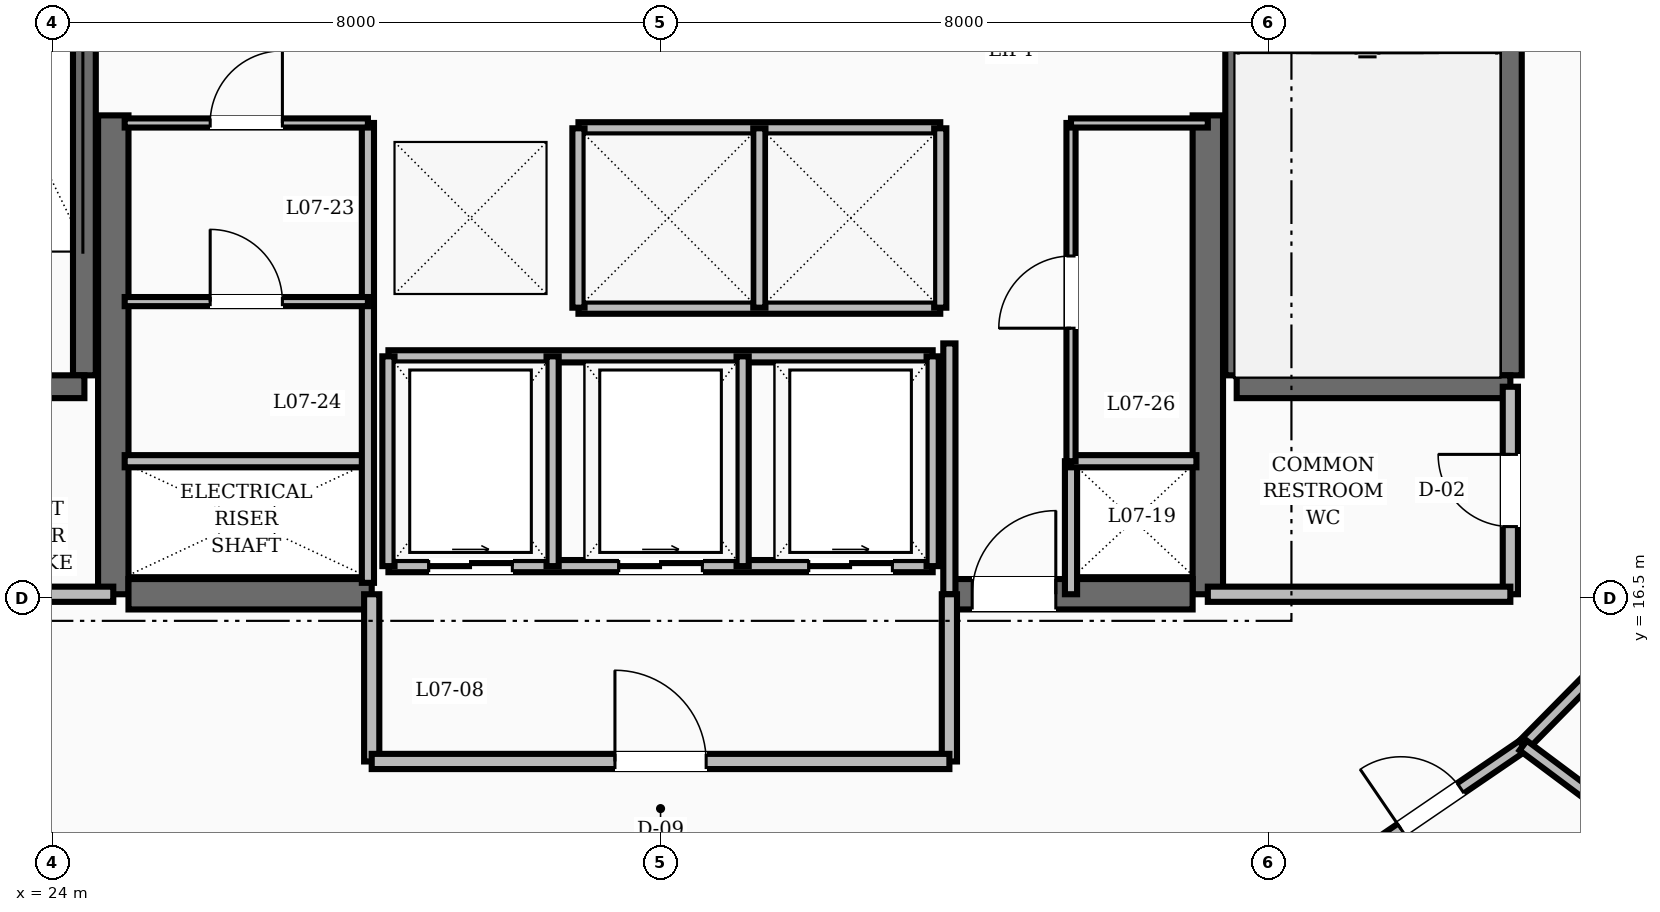
"""IFC4 building model, lengths in metres.
Left out: names, types, materials, properties, quantities, classifications, styles, units other than length and angle.
Written with IfcOpenShell. Run it as: python <this file> out.ifc"""

import sys

from ifc_helpers import new_model, si_unit, direction, frame, frame_2d, origin, place, context, subcontext, project, spatial, rectangle, extrude, element, fill, save


model = new_model("IFC4")
c1 = context("Model", 3, precision=1e-05, world=origin(), true_north=direction((0.0, 1.0)))
c2 = subcontext(c1, "Body", "Model", "MODEL_VIEW")
j1 = project(units=[si_unit("LENGTHUNIT", "METRE"), si_unit("PLANEANGLEUNIT", "RADIAN")], contexts=[c1])
p1 = place(None, origin())
s1 = spatial("IfcSite", under=j1, at=p1, CompositionType="ELEMENT")
p2 = place(p1, origin())
s2 = spatial("IfcBuilding", under=s1, at=p2, CompositionType="ELEMENT")
p3 = place(p2, frame((0.0, 0.0, 34.0)))
s3 = spatial("IfcBuildingStorey", under=s2, at=p3, CompositionType="ELEMENT", Elevation=34.0)
for number, where, z_axis, x_axis in (
    (1, (24.8, 16.55, 0.0), (0.0, 0.0, 1.0), (0.0, 1.0, 0.0)),
    (2, (39.2, 16.55, 0.0), (0.0, 0.0, 1.0), (0.0, 1.0, 0.0)),
):
    element("IfcWall", number, at=place(p3, frame(where, z_axis=z_axis, x_axis=x_axis)), inside=s3, PredefinedType="SHEAR", context=c2, shape_type="SweptSolid", body=[
        extrude(rectangle(XDim=6.3, YDim=0.4, at=frame_2d((3.15, 0.0))), origin(), (0.0, 0.0, 1.0), 3.6),
    ])
p4 = place(p3, frame((25.0, 16.55, 0.0), z_axis=(0.0, 0.0, 1.0), x_axis=(1.0, 0.0, 0.0)))
e3 = element("IfcWall", 3, at=p4, inside=s3, PredefinedType="SHEAR", context=c2, shape_type="SweptSolid", body=[
    extrude(rectangle(XDim=3.2, YDim=0.4, at=frame_2d((1.6, 0.0))), origin(), (0.0, 0.0, 1.0), 3.6),
])
p5 = place(p3, frame((35.8, 16.55, 0.0), z_axis=(0.0, 0.0, 1.0), x_axis=(1.0, 0.0, 0.0)))
e4 = element("IfcWall", 4, at=p5, inside=s3, PredefinedType="SHEAR", context=c2, shape_type="SweptSolid", body=[
    extrude(rectangle(XDim=3.2, YDim=0.4, at=frame_2d((1.6, 0.0))), origin(), (0.0, 0.0, 1.0), 3.6),
])
p6 = place(p5, frame((0.3, 0.0, 0.0)))
e5 = element("IfcOpeningElement", 5, at=p6, cuts=e4, PredefinedType="OPENING", context=c2, shape_type="SweptSolid", body=[
    extrude(rectangle(XDim=1.1, YDim=2.1, at=frame_2d((0.55, 1.05))), frame((0.0, 0.21, 0.0), z_axis=(0.0, -1.0, 0.0), x_axis=(1.0, 0.0, 0.0)), (0.0, 0.0, 1.0), 0.42),
])
p7 = place(p3, frame((24.42, 19.43, 0.0), z_axis=(0.0, 0.0, 1.0), x_axis=(0.0, 1.0, 0.0)))
e6 = element("IfcWall", 6, at=p7, inside=s3, PredefinedType="SHEAR", context=c2, shape_type="SweptSolid", body=[
    extrude(rectangle(XDim=8.74, YDim=0.3, at=frame_2d((4.37, 0.0))), origin(), (0.0, 0.0, 1.0), 3.6),
])
p8 = place(p3, frame((20.82, 19.28, 0.0), z_axis=(0.0, 0.0, 1.0), x_axis=(1.0, 0.0, 0.0)))
e7 = element("IfcWall", 7, at=p8, inside=s3, PredefinedType="SHEAR", context=c2, shape_type="SweptSolid", body=[
    extrude(rectangle(XDim=3.6, YDim=0.3, at=frame_2d((1.8, 0.0))), origin(), (0.0, 0.0, 1.0), 3.6),
])
p9 = place(p8, frame((1.3, 0.0, 0.0)))
e8 = element("IfcOpeningElement", 8, at=p9, cuts=e7, PredefinedType="OPENING", context=c2, shape_type="SweptSolid", body=[
    extrude(rectangle(XDim=1.1, YDim=2.1, at=frame_2d((0.55, 1.05))), frame((0.0, 0.16, 0.0), z_axis=(0.0, -1.0, 0.0), x_axis=(1.0, 0.0, 0.0)), (0.0, 0.0, 1.0), 0.32),
])
for number, where, z_axis, x_axis in (
    (9, (43.18, 19.43, 0.0), (0.0, 0.0, 1.0), (0.0, 1.0, 0.0)),
    (10, (39.58, 19.43, 0.0), (0.0, 0.0, 1.0), (0.0, 1.0, 0.0)),
):
    element("IfcWall", number, at=place(p3, frame(where, z_axis=z_axis, x_axis=x_axis)), inside=s3, PredefinedType="SHEAR", context=c2, shape_type="SweptSolid", body=[
        extrude(rectangle(XDim=8.74, YDim=0.3, at=frame_2d((4.37, 0.0))), origin(), (0.0, 0.0, 1.0), 3.6),
    ])
p10 = place(p3, frame((39.58, 19.28, 0.0), z_axis=(0.0, 0.0, 1.0), x_axis=(1.0, 0.0, 0.0)))
e11 = element("IfcWall", 11, at=p10, inside=s3, PredefinedType="SHEAR", context=c2, shape_type="SweptSolid", body=[
    extrude(rectangle(XDim=3.6, YDim=0.3, at=frame_2d((1.8, 0.0))), origin(), (0.0, 0.0, 1.0), 3.6),
])
p11 = place(p3, frame((20.82, 16.55, 0.0), z_axis=(0.0, 0.0, 1.0), x_axis=(1.0, 0.0, 0.0)))
e12 = element("IfcWall", 12, at=p11, inside=s3, PredefinedType="SOLIDWALL", context=c2, shape_type="SweptSolid", body=[
    extrude(rectangle(XDim=3.98, YDim=0.2, at=frame_2d((1.99, 0.0))), origin(), (0.0, 0.0, 1.0), 2.61),
])
p12 = place(p3, frame((43.18, 16.55, 0.0), z_axis=(0.0, 0.0, 1.0), x_axis=(0.0, 1.0, 0.0)))
e13 = element("IfcWall", 13, at=p12, inside=s3, PredefinedType="SOLIDWALL", context=c2, shape_type="SweptSolid", body=[
    extrude(rectangle(XDim=2.73, YDim=0.2, at=frame_2d((1.365, 0.0))), origin(), (0.0, 0.0, 1.0), 2.61),
])
p13 = place(p12, frame((0.89, 0.0, 0.0)))
e14 = element("IfcOpeningElement", 14, at=p13, cuts=e13, PredefinedType="OPENING", context=c2, shape_type="SweptSolid", body=[
    extrude(rectangle(XDim=0.95, YDim=2.1, at=frame_2d((0.475, 1.05))), frame((0.0, 0.11, 0.0), z_axis=(0.0, -1.0, 0.0), x_axis=(1.0, 0.0, 0.0)), (0.0, 0.0, 1.0), 0.22),
])
p14 = place(p3, frame((39.2, 16.55, 0.0), z_axis=(0.0, 0.0, 1.0), x_axis=(1.0, 0.0, 0.0)))
e15 = element("IfcWall", 15, at=p14, inside=s3, PredefinedType="SOLIDWALL", context=c2, shape_type="SweptSolid", body=[
    extrude(rectangle(XDim=3.98, YDim=0.2, at=frame_2d((1.99, 0.0))), origin(), (0.0, 0.0, 1.0), 2.61),
])
p15 = place(p3, frame((35.8, 16.55, 0.0), z_axis=(0.0, 0.0, 1.0), x_axis=(0.0, 1.0, 0.0)))
e16 = element("IfcWall", 16, at=p15, inside=s3, PredefinedType="SOLIDWALL", context=c2, shape_type="SweptSolid", body=[
    extrude(rectangle(XDim=3.3, YDim=0.16, at=frame_2d((1.65, 0.0))), origin(), (0.0, 0.0, 1.0), 2.61),
])
p16 = place(p3, frame((37.4, 16.55, 0.0), z_axis=(0.0, 0.0, 1.0), x_axis=(0.0, 1.0, 0.0)))
e17 = element("IfcWall", 17, at=p16, inside=s3, PredefinedType="SOLIDWALL", context=c2, shape_type="SweptSolid", body=[
    extrude(rectangle(XDim=1.75, YDim=0.16, at=frame_2d((0.875, 0.0))), origin(), (0.0, 0.0, 1.0), 2.61),
])
for number, where, z_axis, x_axis in (
    (18, (28.2, 14.35, 0.0), (0.0, 0.0, 1.0), (0.0, 1.0, 0.0)),
    (19, (35.8, 14.35, 0.0), (0.0, 0.0, 1.0), (0.0, 1.0, 0.0)),
):
    element("IfcWall", number, at=place(p3, frame(where, z_axis=z_axis, x_axis=x_axis)), inside=s3, PredefinedType="SOLIDWALL", context=c2, shape_type="SweptSolid", body=[
        extrude(rectangle(XDim=2.2, YDim=0.2, at=frame_2d((1.1, 0.0))), origin(), (0.0, 0.0, 1.0), 2.61),
    ])
p17 = place(p3, frame((28.2, 14.35, 0.0), z_axis=(0.0, 0.0, 1.0), x_axis=(1.0, 0.0, 0.0)))
e20 = element("IfcWall", 20, at=p17, inside=s3, PredefinedType="SOLIDWALL", context=c2, shape_type="SweptSolid", body=[
    extrude(rectangle(XDim=7.6, YDim=0.2, at=frame_2d((3.8, 0.0))), origin(), (0.0, 0.0, 1.0), 2.61),
])
p18 = place(p17, frame((3.2, 0.0, 0.0)))
e21 = element("IfcOpeningElement", 21, at=p18, cuts=e20, PredefinedType="OPENING", context=c2, shape_type="SweptSolid", body=[
    extrude(rectangle(XDim=1.2, YDim=2.1, at=frame_2d((0.6, 1.05))), frame((0.0, 0.11, 0.0), z_axis=(0.0, -1.0, 0.0), x_axis=(1.0, 0.0, 0.0)), (0.0, 0.0, 1.0), 0.22),
])
for number, where, z_axis, x_axis in (
    (22, (30.92, 22.68, 0.0), (0.0, 0.0, 1.0), (1.0, 0.0, 0.0)),
    (23, (30.92, 20.32, 0.0), (0.0, 0.0, 1.0), (1.0, 0.0, 0.0)),
):
    element("IfcWall", number, at=place(p3, frame(where, z_axis=z_axis, x_axis=x_axis)), inside=s3, PredefinedType="SOLIDWALL", context=c2, shape_type="SweptSolid", body=[
        extrude(rectangle(XDim=4.76, YDim=0.16, at=frame_2d((2.38, 0.0))), origin(), (0.0, 0.0, 1.0), 2.61),
    ])
for number, where, z_axis, x_axis in (
    (24, (30.92, 20.32, 0.0), (0.0, 0.0, 1.0), (0.0, 1.0, 0.0)),
    (25, (33.3, 20.32, 0.0), (0.0, 0.0, 1.0), (0.0, 1.0, 0.0)),
    (26, (35.68, 20.32, 0.0), (0.0, 0.0, 1.0), (0.0, 1.0, 0.0)),
):
    element("IfcWall", number, at=place(p3, frame(where, z_axis=z_axis, x_axis=x_axis)), inside=s3, PredefinedType="SOLIDWALL", context=c2, shape_type="SweptSolid", body=[
        extrude(rectangle(XDim=2.36, YDim=0.16, at=frame_2d((1.18, 0.0))), origin(), (0.0, 0.0, 1.0), 2.61),
    ])
p19 = place(p3, frame((28.42, 16.92, 0.0), z_axis=(0.0, 0.0, 1.0), x_axis=(1.0, 0.0, 0.0)))
e27 = element("IfcWall", 27, at=p19, inside=s3, PredefinedType="SOLIDWALL", context=c2, shape_type="SweptSolid", body=[
    extrude(rectangle(XDim=7.16, YDim=0.16, at=frame_2d((3.58, 0.0))), origin(), (0.0, 0.0, 1.0), 2.61),
])
p20 = place(p19, frame((0.53, 0.0, 0.0)))
e28 = element("IfcOpeningElement", 28, at=p20, cuts=e27, PredefinedType="OPENING", context=c2, shape_type="SweptSolid", body=[
    extrude(rectangle(XDim=1.1, YDim=2.15, at=frame_2d((0.55, 1.075))), frame((0.0, 0.09, 0.0), z_axis=(0.0, -1.0, 0.0), x_axis=(1.0, 0.0, 0.0)), (0.0, 0.0, 1.0), 0.18),
])
p21 = place(p19, frame((3.03, 0.0, 0.0)))
e29 = element("IfcOpeningElement", 29, at=p21, cuts=e27, PredefinedType="OPENING", context=c2, shape_type="SweptSolid", body=[
    extrude(rectangle(XDim=1.1, YDim=2.15, at=frame_2d((0.55, 1.075))), frame((0.0, 0.09, 0.0), z_axis=(0.0, -1.0, 0.0), x_axis=(1.0, 0.0, 0.0)), (0.0, 0.0, 1.0), 0.18),
])
p22 = place(p19, frame((5.53, 0.0, 0.0)))
e30 = element("IfcOpeningElement", 30, at=p22, cuts=e27, PredefinedType="OPENING", context=c2, shape_type="SweptSolid", body=[
    extrude(rectangle(XDim=1.1, YDim=2.15, at=frame_2d((0.55, 1.075))), frame((0.0, 0.09, 0.0), z_axis=(0.0, -1.0, 0.0), x_axis=(1.0, 0.0, 0.0)), (0.0, 0.0, 1.0), 0.18),
])
p23 = place(p3, frame((28.42, 19.68, 0.0), z_axis=(0.0, 0.0, 1.0), x_axis=(1.0, 0.0, 0.0)))
e31 = element("IfcWall", 31, at=p23, inside=s3, PredefinedType="SOLIDWALL", context=c2, shape_type="SweptSolid", body=[
    extrude(rectangle(XDim=7.16, YDim=0.16, at=frame_2d((3.58, 0.0))), origin(), (0.0, 0.0, 1.0), 2.61),
])
for number, where, z_axis, x_axis in (
    (32, (28.42, 16.92, 0.0), (0.0, 0.0, 1.0), (0.0, 1.0, 0.0)),
    (33, (30.58, 16.92, 0.0), (0.0, 0.0, 1.0), (0.0, 1.0, 0.0)),
    (34, (33.08, 16.92, 0.0), (0.0, 0.0, 1.0), (0.0, 1.0, 0.0)),
    (35, (35.58, 16.92, 0.0), (0.0, 0.0, 1.0), (0.0, 1.0, 0.0)),
):
    element("IfcWall", number, at=place(p3, frame(where, z_axis=z_axis, x_axis=x_axis)), inside=s3, PredefinedType="SOLIDWALL", context=c2, shape_type="SweptSolid", body=[
        extrude(rectangle(XDim=2.76, YDim=0.16, at=frame_2d((1.38, 0.0))), origin(), (0.0, 0.0, 1.0), 2.61),
    ])
p24 = place(p3, frame((24.95, 18.3, 0.0), z_axis=(0.0, 0.0, 1.0), x_axis=(1.0, 0.0, 0.0)))
e36 = element("IfcWall", 36, at=p24, inside=s3, PredefinedType="SOLIDWALL", context=c2, shape_type="SweptSolid", body=[
    extrude(rectangle(XDim=3.2, YDim=0.16, at=frame_2d((1.6, 0.0))), origin(), (0.0, 0.0, 1.0), 2.61),
])
p25 = place(p3, frame((28.15, 16.7, 0.0), z_axis=(0.0, 0.0, 1.0), x_axis=(0.0, 1.0, 0.0)))
e37 = element("IfcWall", 37, at=p25, inside=s3, PredefinedType="SOLIDWALL", context=c2, shape_type="SweptSolid", body=[
    extrude(rectangle(XDim=6.05, YDim=0.16, at=frame_2d((3.025, 0.0))), origin(), (0.0, 0.0, 1.0), 2.61),
])
p26 = place(p3, frame((37.4, 18.3, 0.0), z_axis=(0.0, 0.0, 1.0), x_axis=(1.0, 0.0, 0.0)))
e38 = element("IfcWall", 38, at=p26, inside=s3, PredefinedType="SOLIDWALL", context=c2, shape_type="SweptSolid", body=[
    extrude(rectangle(XDim=1.65, YDim=0.16, at=frame_2d((0.825, 0.0))), origin(), (0.0, 0.0, 1.0), 2.61),
])
p27 = place(p3, frame((24.95, 22.75, 0.0), z_axis=(0.0, 0.0, 1.0), x_axis=(1.0, 0.0, 0.0)))
e39 = element("IfcWall", 39, at=p27, inside=s3, PredefinedType="PARTITIONING", context=c2, shape_type="SweptSolid", body=[
    extrude(rectangle(XDim=3.2, YDim=0.12, at=frame_2d((1.6, 0.0))), origin(), (0.0, 0.0, 1.0), 2.61),
])
p28 = place(p27, frame((1.125, 0.0, 0.0)))
e40 = element("IfcOpeningElement", 40, at=p28, cuts=e39, PredefinedType="OPENING", context=c2, shape_type="SweptSolid", body=[
    extrude(rectangle(XDim=0.95, YDim=2.1, at=frame_2d((0.475, 1.05))), frame((0.0, 0.07, 0.0), z_axis=(0.0, -1.0, 0.0), x_axis=(1.0, 0.0, 0.0)), (0.0, 0.0, 1.0), 0.14),
])
p29 = place(p3, frame((37.4, 18.3, 0.0), z_axis=(0.0, 0.0, 1.0), x_axis=(0.0, 1.0, 0.0)))
e41 = element("IfcWall", 41, at=p29, inside=s3, PredefinedType="PARTITIONING", context=c2, shape_type="SweptSolid", body=[
    extrude(rectangle(XDim=4.45, YDim=0.12, at=frame_2d((2.225, 0.0))), origin(), (0.0, 0.0, 1.0), 2.61),
])
p30 = place(p29, frame((1.75, 0.0, 0.0)))
e42 = element("IfcOpeningElement", 42, at=p30, cuts=e41, PredefinedType="OPENING", context=c2, shape_type="SweptSolid", body=[
    extrude(rectangle(XDim=0.95, YDim=2.1, at=frame_2d((0.475, 1.05))), frame((0.0, 0.07, 0.0), z_axis=(0.0, -1.0, 0.0), x_axis=(1.0, 0.0, 0.0)), (0.0, 0.0, 1.0), 0.14),
])
p31 = place(p3, frame((37.4, 22.75, 0.0), z_axis=(0.0, 0.0, 1.0), x_axis=(1.0, 0.0, 0.0)))
e43 = element("IfcWall", 43, at=p31, inside=s3, PredefinedType="PARTITIONING", context=c2, shape_type="SweptSolid", body=[
    extrude(rectangle(XDim=1.8, YDim=0.12, at=frame_2d((0.9, 0.0))), origin(), (0.0, 0.0, 1.0), 2.61),
])
p32 = place(p3, frame((24.95, 20.4, 0.0), z_axis=(0.0, 0.0, 1.0), x_axis=(1.0, 0.0, 0.0)))
e44 = element("IfcWall", 44, at=p32, inside=s3, PredefinedType="PARTITIONING", context=c2, shape_type="SweptSolid", body=[
    extrude(rectangle(XDim=3.2, YDim=0.12, at=frame_2d((1.6, 0.0))), origin(), (0.0, 0.0, 1.0), 2.61),
])
p33 = place(p32, frame((1.125, 0.0, 0.0)))
e45 = element("IfcOpeningElement", 45, at=p33, cuts=e44, PredefinedType="OPENING", context=c2, shape_type="SweptSolid", body=[
    extrude(rectangle(XDim=0.95, YDim=2.1, at=frame_2d((0.475, 1.05))), frame((0.0, 0.07, 0.0), z_axis=(0.0, -1.0, 0.0), x_axis=(1.0, 0.0, 0.0)), (0.0, 0.0, 1.0), 0.14),
])
p34 = place(p3, frame((40.917, 12.9, 0.0), z_axis=(0.0, 0.0, 1.0), x_axis=(0.825929039072, 0.563774088104, 0.0)))
e46 = element("IfcWall", 46, at=p34, inside=s3, PredefinedType="SOLIDWALL", context=c2, shape_type="SweptSolid", body=[
    extrude(rectangle(XDim=2.945, YDim=0.16, at=frame_2d((1.472, 0.0))), origin(), (0.0, 0.0, 1.0), 2.61),
])
p35 = place(p34, frame((0.997, 0.0, 0.0)))
e47 = element("IfcOpeningElement", 47, at=p35, cuts=e46, PredefinedType="OPENING", context=c2, shape_type="SweptSolid", body=[
    extrude(rectangle(XDim=0.95, YDim=2.1, at=frame_2d((0.475, 1.05))), frame((0.0, 0.09, 0.0), z_axis=(0.0, -1.0, 0.0), x_axis=(1.0, 0.0, 0.0)), (0.0, 0.0, 1.0), 0.18),
])
p36 = place(p3, frame((43.349, 14.56, 0.0), z_axis=(0.0, 0.0, 1.0), x_axis=(0.702366174226, 0.711815816981, 0.0)))
e48 = element("IfcWall", 48, at=p36, inside=s3, PredefinedType="SOLIDWALL", context=c2, shape_type="SweptSolid", body=[
    extrude(rectangle(XDim=2.842, YDim=0.16, at=frame_2d((1.421, 0.0))), origin(), (0.0, 0.0, 1.0), 2.61),
])
p37 = place(p3, frame((43.349, 14.56, 0.0), z_axis=(0.0, 0.0, 1.0), x_axis=(0.801077985927, -0.598559989026, 0.0)))
e49 = element("IfcWall", 49, at=p37, inside=s3, PredefinedType="SOLIDWALL", context=c2, shape_type="SweptSolid", body=[
    extrude(rectangle(XDim=7.98, YDim=0.16, at=frame_2d((3.99, 0.0))), origin(), (0.0, 0.0, 1.0), 2.61),
])
p38 = place(p13, origin())
e50 = element("IfcDoor", 50, at=p38, inside=s3, OperationType="SINGLE_SWING_RIGHT", PredefinedType="DOOR", context=c2, shape_type="SweptSolid", body=[
    extrude(rectangle(XDim=0.95, YDim=2.1, at=frame_2d((0.475, 1.05))), frame((0.0, 0.025, 0.0), z_axis=(0.0, -1.0, 0.0), x_axis=(1.0, 0.0, 0.0)), (0.0, 0.0, 1.0), 0.05),
])
fill(e14, e50)
p39 = place(p6, origin())
e51 = element("IfcDoor", 51, at=p39, inside=s3, OperationType="SINGLE_SWING_RIGHT", PredefinedType="DOOR", context=c2, shape_type="SweptSolid", body=[
    extrude(rectangle(XDim=1.1, YDim=2.1, at=frame_2d((0.55, 1.05))), frame((0.0, 0.025, 0.0), z_axis=(0.0, -1.0, 0.0), x_axis=(1.0, 0.0, 0.0)), (0.0, 0.0, 1.0), 0.05),
])
fill(e5, e51)
p40 = place(p18, origin())
e52 = element("IfcDoor", 52, at=p40, inside=s3, OperationType="SINGLE_SWING_LEFT", PredefinedType="DOOR", context=c2, shape_type="SweptSolid", body=[
    extrude(rectangle(XDim=1.2, YDim=2.1, at=frame_2d((0.6, 1.05))), frame((0.0, 0.025, 0.0), z_axis=(0.0, -1.0, 0.0), x_axis=(1.0, 0.0, 0.0)), (0.0, 0.0, 1.0), 0.05),
])
fill(e21, e52)
p41 = place(p20, origin())
e53 = element("IfcDoor", 53, at=p41, inside=s3, OperationType="SLIDING_TO_RIGHT", PredefinedType="DOOR", context=c2, shape_type="SweptSolid", body=[
    extrude(rectangle(XDim=1.1, YDim=2.15, at=frame_2d((0.55, 1.075))), frame((0.0, 0.025, 0.0), z_axis=(0.0, -1.0, 0.0), x_axis=(1.0, 0.0, 0.0)), (0.0, 0.0, 1.0), 0.05),
])
fill(e28, e53)
p42 = place(p21, origin())
e54 = element("IfcDoor", 54, at=p42, inside=s3, OperationType="SLIDING_TO_RIGHT", PredefinedType="DOOR", context=c2, shape_type="SweptSolid", body=[
    extrude(rectangle(XDim=1.1, YDim=2.15, at=frame_2d((0.55, 1.075))), frame((0.0, 0.025, 0.0), z_axis=(0.0, -1.0, 0.0), x_axis=(1.0, 0.0, 0.0)), (0.0, 0.0, 1.0), 0.05),
])
fill(e29, e54)
p43 = place(p22, origin())
e55 = element("IfcDoor", 55, at=p43, inside=s3, OperationType="SLIDING_TO_RIGHT", PredefinedType="DOOR", context=c2, shape_type="SweptSolid", body=[
    extrude(rectangle(XDim=1.1, YDim=2.15, at=frame_2d((0.55, 1.075))), frame((0.0, 0.025, 0.0), z_axis=(0.0, -1.0, 0.0), x_axis=(1.0, 0.0, 0.0)), (0.0, 0.0, 1.0), 0.05),
])
fill(e30, e55)
p44 = place(p28, origin())
e56 = element("IfcDoor", 56, at=p44, inside=s3, OperationType="SINGLE_SWING_RIGHT", PredefinedType="DOOR", context=c2, shape_type="SweptSolid", body=[
    extrude(rectangle(XDim=0.95, YDim=2.1, at=frame_2d((0.475, 1.05))), frame((0.0, 0.025, 0.0), z_axis=(0.0, -1.0, 0.0), x_axis=(1.0, 0.0, 0.0)), (0.0, 0.0, 1.0), 0.05),
])
fill(e40, e56)
p45 = place(p33, origin())
e57 = element("IfcDoor", 57, at=p45, inside=s3, OperationType="SINGLE_SWING_LEFT", PredefinedType="DOOR", context=c2, shape_type="SweptSolid", body=[
    extrude(rectangle(XDim=0.95, YDim=2.1, at=frame_2d((0.475, 1.05))), frame((0.0, 0.025, 0.0), z_axis=(0.0, -1.0, 0.0), x_axis=(1.0, 0.0, 0.0)), (0.0, 0.0, 1.0), 0.05),
])
fill(e45, e57)
p46 = place(p30, origin())
e58 = element("IfcDoor", 58, at=p46, inside=s3, OperationType="SINGLE_SWING_LEFT", PredefinedType="DOOR", context=c2, shape_type="SweptSolid", body=[
    extrude(rectangle(XDim=0.95, YDim=2.1, at=frame_2d((0.475, 1.05))), frame((0.0, 0.025, 0.0), z_axis=(0.0, -1.0, 0.0), x_axis=(1.0, 0.0, 0.0)), (0.0, 0.0, 1.0), 0.05),
])
fill(e42, e58)
p47 = place(p35, origin())
e59 = element("IfcDoor", 59, at=p47, inside=s3, OperationType="SINGLE_SWING_LEFT", PredefinedType="DOOR", context=c2, shape_type="SweptSolid", body=[
    extrude(rectangle(XDim=0.95, YDim=2.1, at=frame_2d((0.475, 1.05))), frame((0.0, 0.025, 0.0), z_axis=(0.0, -1.0, 0.0), x_axis=(1.0, 0.0, 0.0)), (0.0, 0.0, 1.0), 0.05),
])
fill(e47, e59)
save(model, sys.argv[1])
